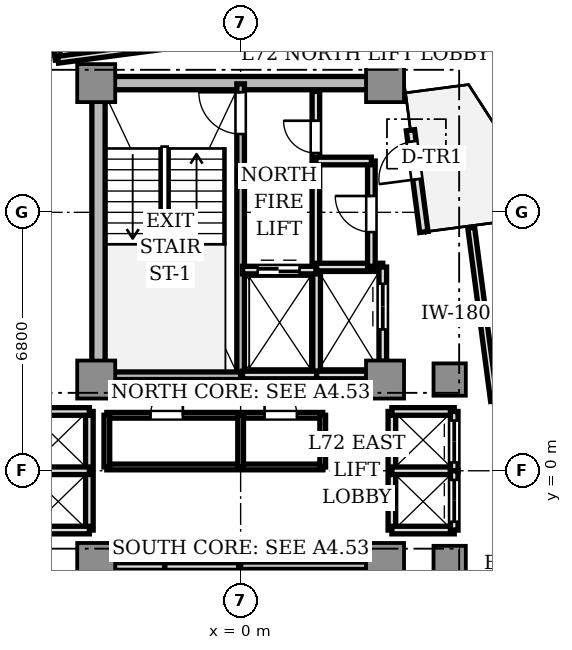
"""IFC4 building model, lengths in metres.
Left out: names, types, materials, properties, quantities, classifications, styles, units other than length and angle.
Written with IfcOpenShell. Run it as: python <this file> out.ifc"""

import sys

from ifc_helpers import new_model, si_unit, direction, frame, frame_2d, origin, origin_2d, place, context, subcontext, project, spatial, rectangle, extrude, source, transform, mapped, element, fill, save


model = new_model("IFC4")
c1 = context("Model", 3, precision=1e-05, world=origin(), true_north=direction((0.0, 1.0)))
c2 = subcontext(c1, "Body", "Model", "MODEL_VIEW")
j1 = project(units=[si_unit("LENGTHUNIT", "METRE"), si_unit("PLANEANGLEUNIT", "RADIAN")], contexts=[c1])
p1 = place(None, origin())
s1 = spatial("IfcSite", under=j1, at=p1, CompositionType="ELEMENT")
p2 = place(p1, origin())
s2 = spatial("IfcBuilding", under=s1, at=p2, CompositionType="ELEMENT")
p3 = place(p2, frame((0.0, 0.0, 257.9)))
s3 = spatial("IfcBuildingStorey", under=s2, at=p3, CompositionType="ELEMENT", Elevation=257.9)
p4 = place(p3, frame((-3.55, 10.2, 0.0), z_axis=(0.0, 0.0, 1.0), x_axis=(1.0, 0.0, 0.0)))
e1 = element("IfcWall", 1, at=p4, inside=s3, PredefinedType="SHEAR", context=c2, shape_type="SweptSolid", body=[
    extrude(rectangle(XDim=7.1, YDim=0.35, at=frame_2d((3.55, 0.0))), origin(), (0.0, 0.0, 1.0), 3.11),
])
p5 = place(p3, frame((-3.74, 2.85, 0.0), z_axis=(0.0, 0.0, 1.0), x_axis=(0.0, 1.0, 0.0)))
e2 = element("IfcWall", 2, at=p5, inside=s3, PredefinedType="SHEAR", context=c2, shape_type="SweptSolid", body=[
    extrude(rectangle(XDim=6.9, YDim=0.35, at=frame_2d((3.45, 0.0))), origin(), (0.0, 0.0, 1.0), 3.11),
])
m1 = source(origin(), c2, "Body", "SweptSolid", [
    extrude(rectangle(XDim=1.0, YDim=1.0, at=origin_2d()), origin(), (0.0, 0.0, 1.0), 3.11),
])
for number, where, z_axis, x_axis in (
    (3, (-3.8, 2.4, 0.0), (0.0, 0.0, 1.0), (1.0, 0.0, 0.0)),
    (4, (3.8, 2.4, 0.0), (0.0, 0.0, 1.0), (1.0, 0.0, 0.0)),
    (5, (-3.8, 10.2, 0.0), (0.0, 0.0, 1.0), (1.0, 0.0, 0.0)),
    (6, (3.8, 10.2, 0.0), (0.0, 0.0, 1.0), (1.0, 0.0, 0.0)),
    (7, (-3.8, -2.4, 0.0), (0.0, 0.0, 1.0), (1.0, 0.0, 0.0)),
    (8, (3.8, -2.4, 0.0), (0.0, 0.0, 1.0), (1.0, 0.0, 0.0)),
):
    element("IfcColumn", number, at=place(p3, frame(where, z_axis=z_axis, x_axis=x_axis)), inside=s3, PredefinedType="COLUMN", context=c2, shape_type="MappedRepresentation", body=[
        mapped(m1, transform((0.0, 0.0, 0.0), scale=1.0)),
    ])
m2 = source(origin(), c2, "Body", "SweptSolid", [
    extrude(rectangle(XDim=0.85, YDim=0.85, at=origin_2d()), origin(), (0.0, 0.0, 1.0), 3.11),
])
for number, where, z_axis, x_axis in (
    (9, (5.5, 2.4, 0.0), (0.0, 0.0, 1.0), (1.0, 0.0, 0.0)),
    (10, (5.5, -2.4, 0.0), (0.0, 0.0, 1.0), (1.0, 0.0, 0.0)),
):
    element("IfcColumn", number, at=place(p3, frame(where, z_axis=z_axis, x_axis=x_axis)), inside=s3, PredefinedType="COLUMN", context=c2, shape_type="MappedRepresentation", body=[
        mapped(m2, transform((0.0, 0.0, 0.0), scale=1.0)),
    ])
p6 = place(p3, frame((4.821, 6.283, 0.0), z_axis=(0.0, 0.0, 1.0), x_axis=(-0.130475563272, 0.991451525486, 0.0)))
e11 = element("IfcWall", 11, at=p6, inside=s3, PredefinedType="STANDARD", context=c2, shape_type="SweptSolid", body=[
    extrude(rectangle(XDim=2.7, YDim=0.22, at=frame_2d((1.35, 0.0))), origin(), (0.0, 0.0, 1.0), 3.11),
])
p7 = place(p6, frame((1.4, 0.0, 0.0)))
e12 = element("IfcOpeningElement", 12, at=p7, cuts=e11, PredefinedType="OPENING", context=c2, shape_type="SweptSolid", body=[
    extrude(rectangle(XDim=1.0, YDim=2.2, at=frame_2d((0.5, 1.1))), frame((0.0, 0.12, 0.0), z_axis=(0.0, -1.0, 0.0), x_axis=(1.0, 0.0, 0.0)), (0.0, 0.0, 1.0), 0.24),
])
p8 = place(p3, frame((0.0, 2.5, 0.0), z_axis=(0.0, 0.0, 1.0), x_axis=(0.0, 1.0, 0.0)))
e13 = element("IfcWall", 13, at=p8, inside=s3, PredefinedType="SOLIDWALL", context=c2, shape_type="SweptSolid", body=[
    extrude(rectangle(XDim=7.68, YDim=0.2, at=frame_2d((3.84, 0.0))), origin(), (0.0, 0.0, 1.0), 3.11),
])
p9 = place(p8, frame((6.36, 0.0, 0.0)))
e14 = element("IfcOpeningElement", 14, at=p9, cuts=e13, PredefinedType="OPENING", context=c2, shape_type="SweptSolid", body=[
    extrude(rectangle(XDim=1.1, YDim=2.15, at=frame_2d((0.55, 1.075))), frame((0.0, 0.11, 0.0), z_axis=(0.0, -1.0, 0.0), x_axis=(1.0, 0.0, 0.0)), (0.0, 0.0, 1.0), 0.22),
])
p10 = place(p3, frame((-3.72, 2.5, 0.0), z_axis=(0.0, 0.0, 1.0), x_axis=(1.0, 0.0, 0.0)))
e15 = element("IfcWall", 15, at=p10, inside=s3, PredefinedType="SOLIDWALL", context=c2, shape_type="SweptSolid", body=[
    extrude(rectangle(XDim=3.72, YDim=0.2, at=frame_2d((1.86, 0.0))), origin(), (0.0, 0.0, 1.0), 3.11),
])
p11 = place(p3, frame((0.0, -10.18, 0.0), z_axis=(0.0, 0.0, 1.0), x_axis=(0.0, 1.0, 0.0)))
e16 = element("IfcWall", 16, at=p11, inside=s3, PredefinedType="SOLIDWALL", context=c2, shape_type="SweptSolid", body=[
    extrude(rectangle(XDim=7.68, YDim=0.2, at=frame_2d((3.84, 0.0))), origin(), (0.0, 0.0, 1.0), 3.11),
])
p12 = place(p11, frame((0.28, 0.0, 0.0)))
e17 = element("IfcOpeningElement", 17, at=p12, cuts=e16, PredefinedType="OPENING", context=c2, shape_type="SweptSolid", body=[
    extrude(rectangle(XDim=1.1, YDim=2.15, at=frame_2d((0.55, 1.075))), frame((0.0, 0.11, 0.0), z_axis=(0.0, -1.0, 0.0), x_axis=(1.0, 0.0, 0.0)), (0.0, 0.0, 1.0), 0.22),
])
p13 = place(p3, frame((0.0, -2.5, 0.0), z_axis=(0.0, 0.0, 1.0), x_axis=(1.0, 0.0, 0.0)))
e18 = element("IfcWall", 18, at=p13, inside=s3, PredefinedType="SOLIDWALL", context=c2, shape_type="SweptSolid", body=[
    extrude(rectangle(XDim=3.72, YDim=0.2, at=frame_2d((1.86, 0.0))), origin(), (0.0, 0.0, 1.0), 3.11),
])
p14 = place(p3, frame((1.98, 5.32, 0.0), z_axis=(0.0, 0.0, 1.0), x_axis=(0.0, 1.0, 0.0)))
e19 = element("IfcWall", 19, at=p14, inside=s3, PredefinedType="SOLIDWALL", context=c2, shape_type="SweptSolid", body=[
    extrude(rectangle(XDim=4.66, YDim=0.2, at=frame_2d((2.33, 0.0))), origin(), (0.0, 0.0, 1.0), 2.66),
])
p15 = place(p14, frame((3.04, 0.0, 0.0)))
e20 = element("IfcOpeningElement", 20, at=p15, cuts=e19, PredefinedType="OPENING", context=c2, shape_type="SweptSolid", body=[
    extrude(rectangle(XDim=0.85, YDim=2.1, at=frame_2d((0.425, 1.05))), frame((0.0, 0.11, 0.0), z_axis=(0.0, -1.0, 0.0), x_axis=(1.0, 0.0, 0.0)), (0.0, 0.0, 1.0), 0.22),
])
p16 = place(p3, frame((2.0, 2.5, 0.0), z_axis=(0.0, 0.0, 1.0), x_axis=(0.0, 1.0, 0.0)))
e21 = element("IfcWall", 21, at=p16, inside=s3, PredefinedType="SOLIDWALL", context=c2, shape_type="SweptSolid", body=[
    extrude(rectangle(XDim=2.78, YDim=0.2, at=frame_2d((1.39, 0.0))), origin(), (0.0, 0.0, 1.0), 2.66),
])
p17 = place(p3, frame((0.05, 2.52, 0.0), z_axis=(0.0, 0.0, 1.0), x_axis=(1.0, 0.0, 0.0)))
e22 = element("IfcWall", 22, at=p17, inside=s3, PredefinedType="SOLIDWALL", context=c2, shape_type="SweptSolid", body=[
    extrude(rectangle(XDim=1.95, YDim=0.2, at=frame_2d((0.975, 0.0))), origin(), (0.0, 0.0, 1.0), 2.66),
])
p18 = place(p3, frame((0.05, 5.28, 0.0), z_axis=(0.0, 0.0, 1.0), x_axis=(1.0, 0.0, 0.0)))
e23 = element("IfcWall", 23, at=p18, inside=s3, PredefinedType="SOLIDWALL", context=c2, shape_type="SweptSolid", body=[
    extrude(rectangle(XDim=1.93, YDim=0.2, at=frame_2d((0.965, 0.0))), origin(), (0.0, 0.0, 1.0), 2.66),
])
p19 = place(p18, frame((0.4, 0.0, 0.0)))
e24 = element("IfcOpeningElement", 24, at=p19, cuts=e23, PredefinedType="OPENING", context=c2, shape_type="SweptSolid", body=[
    extrude(rectangle(XDim=1.1, YDim=2.2, at=frame_2d((0.55, 1.1))), frame((0.0, 0.11, 0.0), z_axis=(0.0, -1.0, 0.0), x_axis=(1.0, 0.0, 0.0)), (0.0, 0.0, 1.0), 0.22),
])
p20 = place(p3, frame((-2.0, -5.28, 0.0), z_axis=(0.0, 0.0, 1.0), x_axis=(0.0, 1.0, 0.0)))
e25 = element("IfcWall", 25, at=p20, inside=s3, PredefinedType="SOLIDWALL", context=c2, shape_type="SweptSolid", body=[
    extrude(rectangle(XDim=2.78, YDim=0.2, at=frame_2d((1.39, 0.0))), origin(), (0.0, 0.0, 1.0), 2.66),
])
p21 = place(p3, frame((-2.0, -2.52, 0.0), z_axis=(0.0, 0.0, 1.0), x_axis=(1.0, 0.0, 0.0)))
e26 = element("IfcWall", 26, at=p21, inside=s3, PredefinedType="SOLIDWALL", context=c2, shape_type="SweptSolid", body=[
    extrude(rectangle(XDim=1.95, YDim=0.2, at=frame_2d((0.975, 0.0))), origin(), (0.0, 0.0, 1.0), 2.66),
])
p22 = place(p3, frame((2.0, 2.52, 0.0), z_axis=(0.0, 0.0, 1.0), x_axis=(1.0, 0.0, 0.0)))
e27 = element("IfcWall", 27, at=p22, inside=s3, PredefinedType="SOLIDWALL", context=c2, shape_type="SweptSolid", body=[
    extrude(rectangle(XDim=1.32, YDim=0.2, at=frame_2d((0.66, 0.0))), origin(), (0.0, 0.0, 1.0), 2.66),
])
p23 = place(p3, frame((2.0, 5.36, 0.0), z_axis=(0.0, 0.0, 1.0), x_axis=(1.0, 0.0, 0.0)))
e28 = element("IfcWall", 28, at=p23, inside=s3, PredefinedType="SOLIDWALL", context=c2, shape_type="SweptSolid", body=[
    extrude(rectangle(XDim=1.74, YDim=0.2, at=frame_2d((0.87, 0.0))), origin(), (0.0, 0.0, 1.0), 2.66),
])
p24 = place(p3, frame((3.74, 2.88, 0.0), z_axis=(0.0, 0.0, 1.0), x_axis=(0.0, 1.0, 0.0)))
e29 = element("IfcWall", 29, at=p24, inside=s3, PredefinedType="SOLIDWALL", context=c2, shape_type="SweptSolid", body=[
    extrude(rectangle(XDim=2.48, YDim=0.2, at=frame_2d((1.24, 0.0))), origin(), (0.0, 0.0, 1.0), 2.66),
])
p25 = place(p24, frame((0.84, 0.0, 0.0)))
e30 = element("IfcOpeningElement", 30, at=p25, cuts=e29, PredefinedType="OPENING", context=c2, shape_type="SweptSolid", body=[
    extrude(rectangle(XDim=1.2, YDim=2.2, at=frame_2d((0.6, 1.1))), frame((0.0, 0.11, 0.0), z_axis=(0.0, -1.0, 0.0), x_axis=(1.0, 0.0, 0.0)), (0.0, 0.0, 1.0), 0.22),
])
p26 = place(p3, frame((-3.32, -2.52, 0.0), z_axis=(0.0, 0.0, 1.0), x_axis=(1.0, 0.0, 0.0)))
e31 = element("IfcWall", 31, at=p26, inside=s3, PredefinedType="SOLIDWALL", context=c2, shape_type="SweptSolid", body=[
    extrude(rectangle(XDim=1.32, YDim=0.2, at=frame_2d((0.66, 0.0))), origin(), (0.0, 0.0, 1.0), 2.66),
])
p27 = place(p3, frame((3.98, -1.56, 0.0), z_axis=(0.0, 0.0, 1.0), x_axis=(0.0, 1.0, 0.0)))
e32 = element("IfcWall", 32, at=p27, inside=s3, PredefinedType="SOLIDWALL", context=c2, shape_type="SweptSolid", body=[
    extrude(rectangle(XDim=3.12, YDim=0.2, at=frame_2d((1.56, 0.0))), origin(), (0.0, 0.0, 1.0), 2.33),
])
for number, where, z_axis, x_axis in (
    (33, (3.98, 1.56, 0.0), (0.0, 0.0, 1.0), (1.0, 0.0, 0.0)),
    (34, (3.98, -1.56, 0.0), (0.0, 0.0, 1.0), (1.0, 0.0, 0.0)),
    (35, (3.98, 0.0, 0.0), (0.0, 0.0, 1.0), (1.0, 0.0, 0.0)),
):
    element("IfcWall", number, at=place(p3, frame(where, z_axis=z_axis, x_axis=x_axis)), inside=s3, PredefinedType="SOLIDWALL", context=c2, shape_type="SweptSolid", body=[
        extrude(rectangle(XDim=1.64, YDim=0.2, at=frame_2d((0.82, 0.0))), origin(), (0.0, 0.0, 1.0), 2.66),
    ])
p28 = place(p3, frame((5.62, 0.0, 0.0), z_axis=(0.0, 0.0, 1.0), x_axis=(0.0, 1.0, 0.0)))
e36 = element("IfcWall", 36, at=p28, inside=s3, PredefinedType="SOLIDWALL", context=c2, shape_type="SweptSolid", body=[
    extrude(rectangle(XDim=1.56, YDim=0.2, at=frame_2d((0.78, 0.0))), origin(), (0.0, 0.0, 1.0), 2.66),
])
p29 = place(p28, frame((0.22, 0.0, 0.0)))
e37 = element("IfcOpeningElement", 37, at=p29, cuts=e36, PredefinedType="OPENING", context=c2, shape_type="SweptSolid", body=[
    extrude(rectangle(XDim=1.1, YDim=2.2, at=frame_2d((0.55, 1.1))), frame((0.0, 0.11, 0.0), z_axis=(0.0, -1.0, 0.0), x_axis=(1.0, 0.0, 0.0)), (0.0, 0.0, 1.0), 0.22),
])
p30 = place(p3, frame((5.62, -1.56, 0.0), z_axis=(0.0, 0.0, 1.0), x_axis=(0.0, 1.0, 0.0)))
e38 = element("IfcWall", 38, at=p30, inside=s3, PredefinedType="SOLIDWALL", context=c2, shape_type="SweptSolid", body=[
    extrude(rectangle(XDim=1.56, YDim=0.2, at=frame_2d((0.78, 0.0))), origin(), (0.0, 0.0, 1.0), 2.66),
])
p31 = place(p30, frame((0.22, 0.0, 0.0)))
e39 = element("IfcOpeningElement", 39, at=p31, cuts=e38, PredefinedType="OPENING", context=c2, shape_type="SweptSolid", body=[
    extrude(rectangle(XDim=1.1, YDim=2.2, at=frame_2d((0.55, 1.1))), frame((0.0, 0.11, 0.0), z_axis=(0.0, -1.0, 0.0), x_axis=(1.0, 0.0, 0.0)), (0.0, 0.0, 1.0), 0.22),
])
p32 = place(p3, frame((-3.98, -1.56, 0.0), z_axis=(0.0, 0.0, 1.0), x_axis=(0.0, 1.0, 0.0)))
e40 = element("IfcWall", 40, at=p32, inside=s3, PredefinedType="SOLIDWALL", context=c2, shape_type="SweptSolid", body=[
    extrude(rectangle(XDim=3.12, YDim=0.2, at=frame_2d((1.56, 0.0))), origin(), (0.0, 0.0, 1.0), 2.33),
])
for number, where, z_axis, x_axis in (
    (41, (-5.62, 1.56, 0.0), (0.0, 0.0, 1.0), (1.0, 0.0, 0.0)),
    (42, (-5.62, -1.56, 0.0), (0.0, 0.0, 1.0), (1.0, 0.0, 0.0)),
    (43, (-5.62, 0.0, 0.0), (0.0, 0.0, 1.0), (1.0, 0.0, 0.0)),
):
    element("IfcWall", number, at=place(p3, frame(where, z_axis=z_axis, x_axis=x_axis)), inside=s3, PredefinedType="SOLIDWALL", context=c2, shape_type="SweptSolid", body=[
        extrude(rectangle(XDim=1.64, YDim=0.2, at=frame_2d((0.82, 0.0))), origin(), (0.0, 0.0, 1.0), 2.66),
    ])
p33 = place(p3, frame((3.44, 5.38, 0.0), z_axis=(0.0, 0.0, 1.0), x_axis=(0.0, 1.0, 0.0)))
e44 = element("IfcWall", 44, at=p33, inside=s3, PredefinedType="SOLIDWALL", context=c2, shape_type="SweptSolid", body=[
    extrude(rectangle(XDim=2.77, YDim=0.2, at=frame_2d((1.385, 0.0))), origin(), (0.0, 0.0, 1.0), 2.66),
])
p34 = place(p33, frame((0.9, 0.0, 0.0)))
e45 = element("IfcOpeningElement", 45, at=p34, cuts=e44, PredefinedType="OPENING", context=c2, shape_type="SweptSolid", body=[
    extrude(rectangle(XDim=0.95, YDim=2.15, at=frame_2d((0.475, 1.075))), frame((0.0, 0.11, 0.0), z_axis=(0.0, -1.0, 0.0), x_axis=(1.0, 0.0, 0.0)), (0.0, 0.0, 1.0), 0.22),
])
p35 = place(p3, frame((1.98, 8.15, 0.0), z_axis=(0.0, 0.0, 1.0), x_axis=(1.0, 0.0, 0.0)))
e46 = element("IfcWall", 46, at=p35, inside=s3, PredefinedType="SOLIDWALL", context=c2, shape_type="SweptSolid", body=[
    extrude(rectangle(XDim=1.46, YDim=0.2, at=frame_2d((0.73, 0.0))), origin(), (0.0, 0.0, 1.0), 2.66),
])
p36 = place(p3, frame((-3.52, 0.1, 0.0), z_axis=(0.0, 0.0, 1.0), x_axis=(1.0, 0.0, 0.0)))
e47 = element("IfcWall", 47, at=p36, inside=s3, PredefinedType="PARTITIONING", context=c2, shape_type="SweptSolid", body=[
    extrude(rectangle(XDim=5.68, YDim=0.15, at=frame_2d((2.84, 0.0))), origin(), (0.0, 0.0, 1.0), 2.66),
])
p37 = place(p3, frame((-3.52, 1.46, 0.0), z_axis=(0.0, 0.0, 1.0), x_axis=(1.0, 0.0, 0.0)))
e48 = element("IfcWall", 48, at=p37, inside=s3, PredefinedType="PARTITIONING", context=c2, shape_type="SweptSolid", body=[
    extrude(rectangle(XDim=5.68, YDim=0.15, at=frame_2d((2.84, 0.0))), origin(), (0.0, 0.0, 1.0), 2.66),
])
p38 = place(p37, frame((1.15, 0.0, 0.0)))
e49 = element("IfcOpeningElement", 49, at=p38, cuts=e48, PredefinedType="OPENING", context=c2, shape_type="SweptSolid", body=[
    extrude(rectangle(XDim=0.85, YDim=2.1, at=frame_2d((0.425, 1.05))), frame((0.0, 0.085, 0.0), z_axis=(0.0, -1.0, 0.0), x_axis=(1.0, 0.0, 0.0)), (0.0, 0.0, 1.0), 0.17),
])
p39 = place(p37, frame((4.15, 0.0, 0.0)))
e50 = element("IfcOpeningElement", 50, at=p39, cuts=e48, PredefinedType="OPENING", context=c2, shape_type="SweptSolid", body=[
    extrude(rectangle(XDim=0.85, YDim=2.1, at=frame_2d((0.425, 1.05))), frame((0.0, 0.085, 0.0), z_axis=(0.0, -1.0, 0.0), x_axis=(1.0, 0.0, 0.0)), (0.0, 0.0, 1.0), 0.17),
])
p40 = place(p3, frame((-3.52, 0.1, 0.0), z_axis=(0.0, 0.0, 1.0), x_axis=(0.0, 1.0, 0.0)))
e51 = element("IfcWall", 51, at=p40, inside=s3, PredefinedType="PARTITIONING", context=c2, shape_type="SweptSolid", body=[
    extrude(rectangle(XDim=1.36, YDim=0.15, at=frame_2d((0.68, 0.0))), origin(), (0.0, 0.0, 1.0), 2.33),
])
for number, where, z_axis, x_axis in (
    (52, (2.16, 0.1, 0.0), (0.0, 0.0, 1.0), (0.0, 1.0, 0.0)),
    (53, (0.0, 0.1, 0.0), (0.0, 0.0, 1.0), (0.0, 1.0, 0.0)),
):
    element("IfcWall", number, at=place(p3, frame(where, z_axis=z_axis, x_axis=x_axis)), inside=s3, PredefinedType="PARTITIONING", context=c2, shape_type="SweptSolid", body=[
        extrude(rectangle(XDim=1.36, YDim=0.15, at=frame_2d((0.68, 0.0))), origin(), (0.0, 0.0, 1.0), 2.66),
    ])
p41 = place(p3, frame((6.667, 1.836, 0.0), z_axis=(0.0, 0.0, 1.0), x_axis=(-0.130564346904, 0.991439837467, 0.0)))
e54 = element("IfcWall", 54, at=p41, inside=s3, PredefinedType="PARTITIONING", context=c2, shape_type="SweptSolid", body=[
    extrude(rectangle(XDim=4.6, YDim=0.18, at=frame_2d((2.3, 0.0))), origin(), (0.0, 0.0, 1.0), 2.66),
])
p42 = place(p3, frame((-4.803, 10.816, 0.0), z_axis=(0.0, 0.0, 1.0), x_axis=(-0.130572821025, 0.99143872146, 0.0)))
e55 = element("IfcWall", 55, at=p42, inside=s3, PredefinedType="PARTITIONING", context=c2, shape_type="SweptSolid", body=[
    extrude(rectangle(XDim=3.79, YDim=0.15, at=frame_2d((1.895, 0.0))), origin(), (0.0, 0.0, 1.0), 2.66),
])
p43 = place(p42, frame((0.396, 0.0, 0.0)))
e56 = element("IfcOpeningElement", 56, at=p43, cuts=e55, PredefinedType="OPENING", context=c2, shape_type="SweptSolid", body=[
    extrude(rectangle(XDim=0.85, YDim=2.1, at=frame_2d((0.425, 1.05))), frame((0.0, 0.085, 0.0), z_axis=(0.0, -1.0, 0.0), x_axis=(1.0, 0.0, 0.0)), (0.0, 0.0, 1.0), 0.17),
])
p44 = place(p42, frame((2.292, 0.0, 0.0)))
e57 = element("IfcOpeningElement", 57, at=p44, cuts=e55, PredefinedType="OPENING", context=c2, shape_type="SweptSolid", body=[
    extrude(rectangle(XDim=0.85, YDim=2.1, at=frame_2d((0.425, 1.05))), frame((0.0, 0.085, 0.0), z_axis=(0.0, -1.0, 0.0), x_axis=(1.0, 0.0, 0.0)), (0.0, 0.0, 1.0), 0.17),
])
p45 = place(p3, frame((4.021, 11.977, 0.0), z_axis=(0.0, 0.0, 1.0), x_axis=(-0.991445516569, -0.130521215423, 0.0)))
e58 = element("IfcWall", 58, at=p45, inside=s3, PredefinedType="PARTITIONING", context=c2, shape_type="SweptSolid", body=[
    extrude(rectangle(XDim=8.9, YDim=0.18, at=frame_2d((4.45, 0.0))), origin(), (0.0, 0.0, 1.0), 2.66),
])
m3 = source(origin(), c2, "Body", "SweptSolid", [
    extrude(rectangle(XDim=1.0, YDim=0.05, at=origin_2d()), origin(), (0.0, 0.0, 1.0), 2.2),
])
p46 = place(p7, frame((0.5, 0.0, 0.0)))
e59 = element("IfcDoor", 59, at=p46, inside=s3, OperationType="SINGLE_SWING_LEFT", PredefinedType="DOOR", context=c2, shape_type="MappedRepresentation", body=[
    mapped(m3, transform((0.0, 0.0, 0.0), scale=1.0)),
])
fill(e12, e59)
m4 = source(origin(), c2, "Body", "SweptSolid", [
    extrude(rectangle(XDim=1.1, YDim=0.05, at=origin_2d()), origin(), (0.0, 0.0, 1.0), 2.15),
])
p47 = place(p9, frame((0.55, 0.0, 0.0)))
e60 = element("IfcDoor", 60, at=p47, inside=s3, OperationType="SINGLE_SWING_RIGHT", PredefinedType="DOOR", context=c2, shape_type="MappedRepresentation", body=[
    mapped(m4, transform((0.0, 0.0, 0.0), scale=1.0)),
])
fill(e14, e60)
m5 = source(origin(), c2, "Body", "SweptSolid", [
    extrude(rectangle(XDim=0.85, YDim=0.05, at=origin_2d()), origin(), (0.0, 0.0, 1.0), 2.1),
])
p48 = place(p15, frame((0.425, 0.0, 0.0)))
e61 = element("IfcDoor", 61, at=p48, inside=s3, OperationType="SINGLE_SWING_RIGHT", PredefinedType="DOOR", context=c2, shape_type="MappedRepresentation", body=[
    mapped(m5, transform((0.0, 0.0, 0.0), scale=1.0)),
])
fill(e20, e61)
m6 = source(origin(), c2, "Body", "SweptSolid", [
    extrude(rectangle(XDim=1.1, YDim=0.05, at=origin_2d()), origin(), (0.0, 0.0, 1.0), 2.2),
])
p49 = place(p19, frame((0.55, 0.0, 0.0)))
e62 = element("IfcDoor", 62, at=p49, inside=s3, OperationType="DOUBLE_DOOR_SLIDING", PredefinedType="DOOR", context=c2, shape_type="MappedRepresentation", body=[
    mapped(m6, transform((0.0, 0.0, 0.0), scale=1.0)),
])
fill(e24, e62)
m7 = source(origin(), c2, "Body", "SweptSolid", [
    extrude(rectangle(XDim=1.2, YDim=0.05, at=origin_2d()), origin(), (0.0, 0.0, 1.0), 2.2),
])
p50 = place(p25, frame((0.6, 0.0, 0.0)))
e63 = element("IfcDoor", 63, at=p50, inside=s3, OperationType="DOUBLE_DOOR_SLIDING", PredefinedType="DOOR", context=c2, shape_type="MappedRepresentation", body=[
    mapped(m7, transform((0.0, 0.0, 0.0), scale=1.0)),
])
fill(e30, e63)
p51 = place(p29, frame((0.55, 0.0, 0.0)))
e64 = element("IfcDoor", 64, at=p51, inside=s3, OperationType="DOUBLE_DOOR_SLIDING", PredefinedType="DOOR", context=c2, shape_type="MappedRepresentation", body=[
    mapped(m6, transform((0.0, 0.0, 0.0), scale=1.0)),
])
fill(e37, e64)
p52 = place(p31, frame((0.55, 0.0, 0.0)))
e65 = element("IfcDoor", 65, at=p52, inside=s3, OperationType="DOUBLE_DOOR_SLIDING", PredefinedType="DOOR", context=c2, shape_type="MappedRepresentation", body=[
    mapped(m6, transform((0.0, 0.0, 0.0), scale=1.0)),
])
fill(e39, e65)
m8 = source(origin(), c2, "Body", "SweptSolid", [
    extrude(rectangle(XDim=0.95, YDim=0.05, at=origin_2d()), origin(), (0.0, 0.0, 1.0), 2.15),
])
p53 = place(p34, frame((0.475, 0.0, 0.0)))
e66 = element("IfcDoor", 66, at=p53, inside=s3, OperationType="SINGLE_SWING_RIGHT", PredefinedType="DOOR", context=c2, shape_type="MappedRepresentation", body=[
    mapped(m8, transform((0.0, 0.0, 0.0), scale=1.0)),
])
fill(e45, e66)
p54 = place(p38, frame((0.425, 0.0, 0.0)))
e67 = element("IfcDoor", 67, at=p54, inside=s3, OperationType="SINGLE_SWING_RIGHT", PredefinedType="DOOR", context=c2, shape_type="MappedRepresentation", body=[
    mapped(m5, transform((0.0, 0.0, 0.0), scale=1.0)),
])
fill(e49, e67)
p55 = place(p39, frame((0.425, 0.0, 0.0)))
e68 = element("IfcDoor", 68, at=p55, inside=s3, OperationType="SINGLE_SWING_LEFT", PredefinedType="DOOR", context=c2, shape_type="MappedRepresentation", body=[
    mapped(m5, transform((0.0, 0.0, 0.0), scale=1.0)),
])
fill(e50, e68)
save(model, sys.argv[1])
